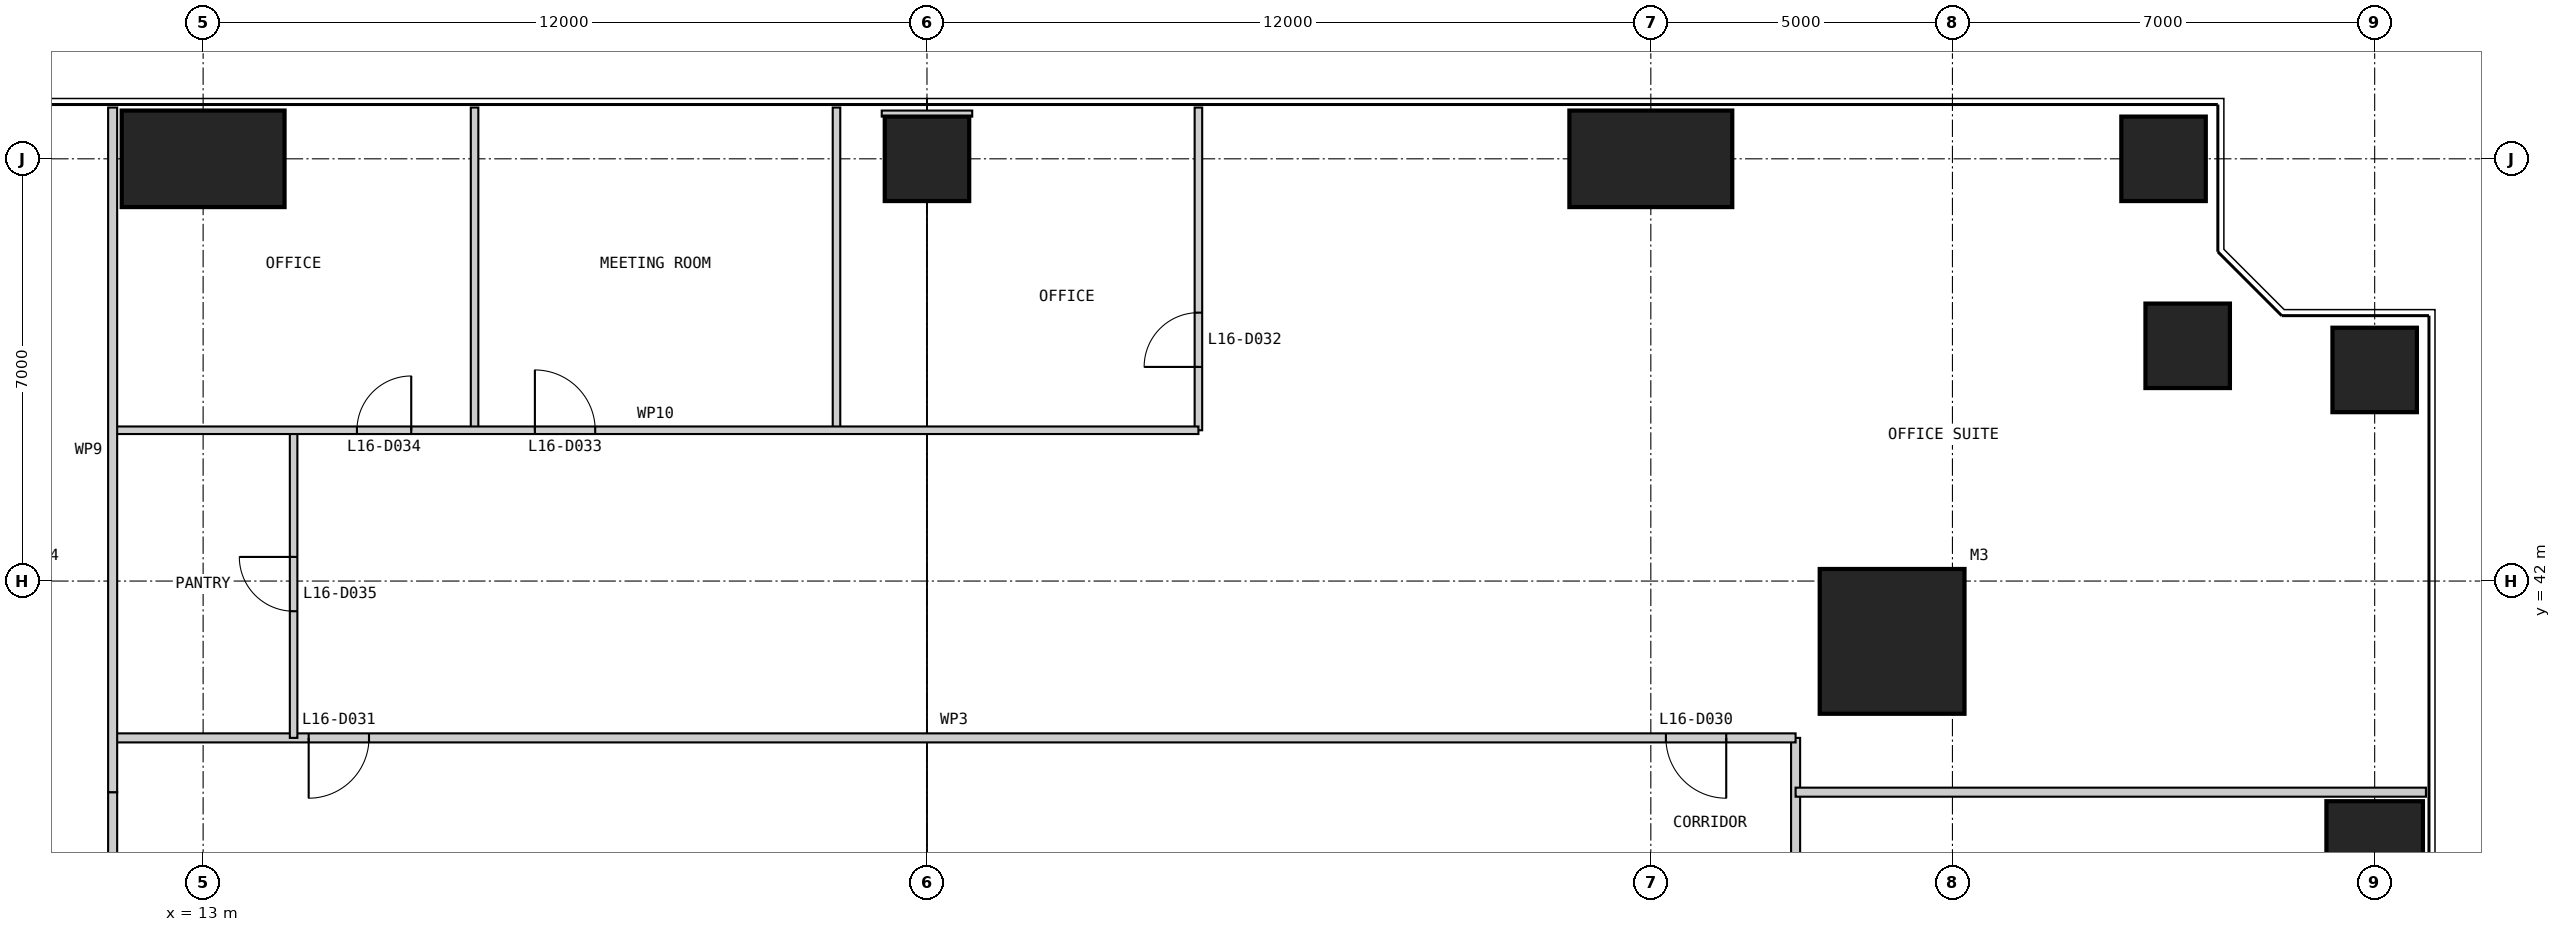
"""IFC4 building model, lengths in metres.
Left out: names, types, materials, properties, quantities, classifications, styles, units other than length and angle.
Written with IfcOpenShell. Run it as: python <this file> out.ifc"""

import sys

from ifc_helpers import new_model, si_unit, direction, frame, frame_2d, origin, origin_2d, place, context, subcontext, project, spatial, rectangle, extrude, element, fill, save


model = new_model("IFC4")
c1 = context("Model", 3, precision=1e-05, world=origin(), true_north=direction((0.0, 1.0)))
c2 = subcontext(c1, "Body", "Model", "MODEL_VIEW")
j1 = project(units=[si_unit("LENGTHUNIT", "METRE"), si_unit("PLANEANGLEUNIT", "RADIAN")], contexts=[c1])
p1 = place(None, origin())
s1 = spatial("IfcSite", under=j1, at=p1, CompositionType="ELEMENT")
p2 = place(p1, origin())
s2 = spatial("IfcBuilding", under=s1, at=p2, CompositionType="ELEMENT")
p3 = place(p2, frame((0.0, 0.0, 71.0)))
s3 = spatial("IfcBuildingStorey", under=s2, at=p3, CompositionType="ELEMENT", Elevation=71.0)
p4 = place(p3, frame((41.0, 41.0, 0.0), z_axis=(0.0, 0.0, 1.0), x_axis=(1.0, 0.0, 0.0)))
e1 = element("IfcColumn", 1, at=p4, inside=s3, PredefinedType="COLUMN", context=c2, shape_type="SweptSolid", body=[
    extrude(rectangle(XDim=2.4, YDim=2.4, at=origin_2d()), origin(), (0.0, 0.0, 1.0), 4.0),
])
p5 = place(p3, frame((49.0, 37.0, 0.0), z_axis=(0.0, 0.0, 1.0), x_axis=(1.0, 0.0, 0.0)))
e2 = element("IfcColumn", 2, at=p5, inside=s3, PredefinedType="COLUMN", context=c2, shape_type="SweptSolid", body=[
    extrude(rectangle(XDim=1.6, YDim=2.7, at=origin_2d()), origin(), (0.0, 0.0, 1.0), 4.0),
])
for number, where, z_axis, x_axis in (
    (3, (49.0, 45.5, 0.0), (0.0, 0.0, 1.0), (1.0, 0.0, 0.0)),
    (4, (45.9, 45.9, 0.0), (0.0, 0.0, 1.0), (1.0, 0.0, 0.0)),
    (5, (45.5, 49.0, 0.0), (0.0, 0.0, 1.0), (1.0, 0.0, 0.0)),
):
    element("IfcColumn", number, at=place(p3, frame(where, z_axis=z_axis, x_axis=x_axis)), inside=s3, PredefinedType="COLUMN", context=c2, shape_type="SweptSolid", body=[
        extrude(rectangle(XDim=1.4, YDim=1.4, at=origin_2d()), origin(), (0.0, 0.0, 1.0), 4.0),
    ])
p6 = place(p3, frame((37.0, 49.0, 0.0), z_axis=(0.0, 0.0, 1.0), x_axis=(1.0, 0.0, 0.0)))
e6 = element("IfcColumn", 6, at=p6, inside=s3, PredefinedType="COLUMN", context=c2, shape_type="SweptSolid", body=[
    extrude(rectangle(XDim=2.7, YDim=1.6, at=origin_2d()), origin(), (0.0, 0.0, 1.0), 4.0),
])
p7 = place(p3, frame((25.0, 49.0, 0.0), z_axis=(0.0, 0.0, 1.0), x_axis=(1.0, 0.0, 0.0)))
e7 = element("IfcColumn", 7, at=p7, inside=s3, PredefinedType="COLUMN", context=c2, shape_type="SweptSolid", body=[
    extrude(rectangle(XDim=1.4, YDim=1.4, at=origin_2d()), origin(), (0.0, 0.0, 1.0), 4.0),
])
p8 = place(p3, frame((13.0, 49.0, 0.0), z_axis=(0.0, 0.0, 1.0), x_axis=(1.0, 0.0, 0.0)))
e8 = element("IfcColumn", 8, at=p8, inside=s3, PredefinedType="COLUMN", context=c2, shape_type="SweptSolid", body=[
    extrude(rectangle(XDim=2.7, YDim=1.6, at=origin_2d()), origin(), (0.0, 0.0, 1.0), 4.0),
])
p9 = place(p3, frame((39.4, 11.5, 0.0), z_axis=(0.0, 0.0, 1.0), x_axis=(0.0, 1.0, 0.0)))
e9 = element("IfcWall", 9, at=p9, inside=s3, PredefinedType="PARTITIONING", context=c2, shape_type="SweptSolid", body=[
    extrude(rectangle(XDim=27.9, YDim=0.15, at=frame_2d((13.95, 0.0))), origin(), (0.0, 0.0, 1.0), 3.85),
])
p10 = place(p9, frame((2.5, 0.0, 0.0)))
e10 = element("IfcOpeningElement", 10, at=p10, cuts=e9, PredefinedType="OPENING", context=c2, shape_type="SweptSolid", body=[
    extrude(rectangle(XDim=1.0, YDim=2.2, at=frame_2d((0.5, 1.1))), frame((0.0, 0.085, 0.0), z_axis=(0.0, -1.0, 0.0), x_axis=(1.0, 0.0, 0.0)), (0.0, 0.0, 1.0), 0.17),
])
p11 = place(p9, frame((9.25, 0.0, 0.0)))
e11 = element("IfcOpeningElement", 11, at=p11, cuts=e9, PredefinedType="OPENING", context=c2, shape_type="SweptSolid", body=[
    extrude(rectangle(XDim=1.0, YDim=2.2, at=frame_2d((0.5, 1.1))), frame((0.0, 0.085, 0.0), z_axis=(0.0, -1.0, 0.0), x_axis=(1.0, 0.0, 0.0)), (0.0, 0.0, 1.0), 0.17),
])
p12 = place(p9, frame((16.75, 0.0, 0.0)))
e12 = element("IfcOpeningElement", 12, at=p12, cuts=e9, PredefinedType="OPENING", context=c2, shape_type="SweptSolid", body=[
    extrude(rectangle(XDim=1.0, YDim=2.2, at=frame_2d((0.5, 1.1))), frame((0.0, 0.085, 0.0), z_axis=(0.0, -1.0, 0.0), x_axis=(1.0, 0.0, 0.0)), (0.0, 0.0, 1.0), 0.17),
])
p13 = place(p9, frame((23.5, 0.0, 0.0)))
e13 = element("IfcOpeningElement", 13, at=p13, cuts=e9, PredefinedType="OPENING", context=c2, shape_type="SweptSolid", body=[
    extrude(rectangle(XDim=1.0, YDim=2.2, at=frame_2d((0.5, 1.1))), frame((0.0, 0.085, 0.0), z_axis=(0.0, -1.0, 0.0), x_axis=(1.0, 0.0, 0.0)), (0.0, 0.0, 1.0), 0.17),
])
p14 = place(p3, frame((39.4, 39.4, 0.0), z_axis=(0.0, 0.0, 1.0), x_axis=(-1.0, 0.0, 0.0)))
e14 = element("IfcWall", 14, at=p14, inside=s3, PredefinedType="PARTITIONING", context=c2, shape_type="SweptSolid", body=[
    extrude(rectangle(XDim=27.9, YDim=0.15, at=frame_2d((13.95, 0.0))), origin(), (0.0, 0.0, 1.0), 3.85),
])
p15 = place(p14, frame((1.15, 0.0, 0.0)))
e15 = element("IfcOpeningElement", 15, at=p15, cuts=e14, PredefinedType="OPENING", context=c2, shape_type="SweptSolid", body=[
    extrude(rectangle(XDim=1.0, YDim=2.2, at=frame_2d((0.5, 1.1))), frame((0.0, 0.085, 0.0), z_axis=(0.0, -1.0, 0.0), x_axis=(1.0, 0.0, 0.0)), (0.0, 0.0, 1.0), 0.17),
])
p16 = place(p14, frame((23.65, 0.0, 0.0)))
e16 = element("IfcOpeningElement", 16, at=p16, cuts=e14, PredefinedType="OPENING", context=c2, shape_type="SweptSolid", body=[
    extrude(rectangle(XDim=1.0, YDim=2.2, at=frame_2d((0.5, 1.1))), frame((0.0, 0.085, 0.0), z_axis=(0.0, -1.0, 0.0), x_axis=(1.0, 0.0, 0.0)), (0.0, 0.0, 1.0), 0.17),
])
p17 = place(p3, frame((49.85, 38.5, 0.0), z_axis=(0.0, 0.0, 1.0), x_axis=(-1.0, 0.0, 0.0)))
e17 = element("IfcWall", 17, at=p17, inside=s3, PredefinedType="PARTITIONING", context=c2, shape_type="SweptSolid", body=[
    extrude(rectangle(XDim=10.45, YDim=0.15, at=frame_2d((5.225, 0.0))), origin(), (0.0, 0.0, 1.0), 3.85),
])
p18 = place(p3, frame((29.5, 49.85, 0.0), z_axis=(0.0, 0.0, 1.0), x_axis=(0.0, -1.0, 0.0)))
e18 = element("IfcWall", 18, at=p18, inside=s3, PredefinedType="PARTITIONING", context=c2, shape_type="SweptSolid", body=[
    extrude(rectangle(XDim=5.35, YDim=0.125, at=frame_2d((2.675, 0.0))), origin(), (0.0, 0.0, 1.0), 3.85),
])
p19 = place(p18, frame((3.4, 0.0, 0.0)))
e19 = element("IfcOpeningElement", 19, at=p19, cuts=e18, PredefinedType="OPENING", context=c2, shape_type="SweptSolid", body=[
    extrude(rectangle(XDim=0.9, YDim=2.2, at=frame_2d((0.45, 1.1))), frame((0.0, 0.073, 0.0), z_axis=(0.0, -1.0, 0.0), x_axis=(1.0, 0.0, 0.0)), (0.0, 0.0, 1.0), 0.145),
])
for number, where, z_axis, x_axis in (
    (20, (23.5, 49.85, 0.0), (0.0, 0.0, 1.0), (0.0, -1.0, 0.0)),
    (21, (17.5, 49.85, 0.0), (0.0, 0.0, 1.0), (0.0, -1.0, 0.0)),
):
    element("IfcWall", number, at=place(p3, frame(where, z_axis=z_axis, x_axis=x_axis)), inside=s3, PredefinedType="PARTITIONING", context=c2, shape_type="SweptSolid", body=[
        extrude(rectangle(XDim=5.35, YDim=0.125, at=frame_2d((2.675, 0.0))), origin(), (0.0, 0.0, 1.0), 3.85),
    ])
p20 = place(p3, frame((14.5, 44.5, 0.0), z_axis=(0.0, 0.0, 1.0), x_axis=(0.0, -1.0, 0.0)))
e22 = element("IfcWall", 22, at=p20, inside=s3, PredefinedType="PARTITIONING", context=c2, shape_type="SweptSolid", body=[
    extrude(rectangle(XDim=5.1, YDim=0.125, at=frame_2d((2.55, 0.0))), origin(), (0.0, 0.0, 1.0), 3.85),
])
p21 = place(p20, frame((2.1, 0.0, 0.0)))
e23 = element("IfcOpeningElement", 23, at=p21, cuts=e22, PredefinedType="OPENING", context=c2, shape_type="SweptSolid", body=[
    extrude(rectangle(XDim=0.9, YDim=2.2, at=frame_2d((0.45, 1.1))), frame((0.0, 0.073, 0.0), z_axis=(0.0, -1.0, 0.0), x_axis=(1.0, 0.0, 0.0)), (0.0, 0.0, 1.0), 0.145),
])
p22 = place(p3, frame((29.5, 44.5, 0.0), z_axis=(0.0, 0.0, 1.0), x_axis=(-1.0, 0.0, 0.0)))
e24 = element("IfcWall", 24, at=p22, inside=s3, PredefinedType="PARTITIONING", context=c2, shape_type="SweptSolid", body=[
    extrude(rectangle(XDim=18.0, YDim=0.125, at=frame_2d((9.0, 0.0))), origin(), (0.0, 0.0, 1.0), 3.85),
])
p23 = place(p22, frame((10.0, 0.0, 0.0)))
e25 = element("IfcOpeningElement", 25, at=p23, cuts=e24, PredefinedType="OPENING", context=c2, shape_type="SweptSolid", body=[
    extrude(rectangle(XDim=1.0, YDim=2.2, at=frame_2d((0.5, 1.1))), frame((0.0, 0.073, 0.0), z_axis=(0.0, -1.0, 0.0), x_axis=(1.0, 0.0, 0.0)), (0.0, 0.0, 1.0), 0.145),
])
p24 = place(p22, frame((13.05, 0.0, 0.0)))
e26 = element("IfcOpeningElement", 26, at=p24, cuts=e24, PredefinedType="OPENING", context=c2, shape_type="SweptSolid", body=[
    extrude(rectangle(XDim=0.9, YDim=2.2, at=frame_2d((0.45, 1.1))), frame((0.0, 0.073, 0.0), z_axis=(0.0, -1.0, 0.0), x_axis=(1.0, 0.0, 0.0)), (0.0, 0.0, 1.0), 0.145),
])
p25 = place(p3, frame((11.5, 38.5, 0.0), z_axis=(0.0, 0.0, 1.0), x_axis=(0.0, -1.0, 0.0)))
e27 = element("IfcWall", 27, at=p25, inside=s3, PredefinedType="PARTITIONING", context=c2, shape_type="SweptSolid", body=[
    extrude(rectangle(XDim=27.0, YDim=0.15, at=frame_2d((13.5, 0.0))), origin(), (0.0, 0.0, 1.0), 3.85),
])
p26 = place(p25, frame((4.0, 0.0, 0.0)))
e28 = element("IfcOpeningElement", 28, at=p26, cuts=e27, PredefinedType="OPENING", context=c2, shape_type="SweptSolid", body=[
    extrude(rectangle(XDim=1.0, YDim=2.2, at=frame_2d((0.5, 1.1))), frame((0.0, 0.085, 0.0), z_axis=(0.0, -1.0, 0.0), x_axis=(1.0, 0.0, 0.0)), (0.0, 0.0, 1.0), 0.17),
])
p27 = place(p25, frame((10.0, 0.0, 0.0)))
e29 = element("IfcOpeningElement", 29, at=p27, cuts=e27, PredefinedType="OPENING", context=c2, shape_type="SweptSolid", body=[
    extrude(rectangle(XDim=1.0, YDim=2.2, at=frame_2d((0.5, 1.1))), frame((0.0, 0.085, 0.0), z_axis=(0.0, -1.0, 0.0), x_axis=(1.0, 0.0, 0.0)), (0.0, 0.0, 1.0), 0.17),
])
p28 = place(p25, frame((17.5, 0.0, 0.0)))
e30 = element("IfcOpeningElement", 30, at=p28, cuts=e27, PredefinedType="OPENING", context=c2, shape_type="SweptSolid", body=[
    extrude(rectangle(XDim=1.0, YDim=2.2, at=frame_2d((0.5, 1.1))), frame((0.0, 0.085, 0.0), z_axis=(0.0, -1.0, 0.0), x_axis=(1.0, 0.0, 0.0)), (0.0, 0.0, 1.0), 0.17),
])
p29 = place(p25, frame((23.5, 0.0, 0.0)))
e31 = element("IfcOpeningElement", 31, at=p29, cuts=e27, PredefinedType="OPENING", context=c2, shape_type="SweptSolid", body=[
    extrude(rectangle(XDim=1.0, YDim=2.2, at=frame_2d((0.5, 1.1))), frame((0.0, 0.085, 0.0), z_axis=(0.0, -1.0, 0.0), x_axis=(1.0, 0.0, 0.0)), (0.0, 0.0, 1.0), 0.17),
])
p30 = place(p3, frame((11.5, 49.85, 0.0), z_axis=(0.0, 0.0, 1.0), x_axis=(0.0, -1.0, 0.0)))
e32 = element("IfcWall", 32, at=p30, inside=s3, PredefinedType="PARTITIONING", context=c2, shape_type="SweptSolid", body=[
    extrude(rectangle(XDim=11.35, YDim=0.15, at=frame_2d((5.675, 0.0))), origin(), (0.0, 0.0, 1.0), 3.85),
])
p31 = place(p3, frame((25.0, 49.8, 0.0), z_axis=(0.0, 0.0, 1.0), x_axis=(0.0, -1.0, 0.0)))
e33 = element("IfcWall", 33, at=p31, inside=s3, PredefinedType="PARTITIONING", context=c2, shape_type="SweptSolid", body=[
    extrude(rectangle(XDim=0.1, YDim=1.5, at=frame_2d((0.05, 0.0))), origin(), (0.0, 0.0, 1.0), 3.85),
])
p32 = place(p15, origin())
e34 = element("IfcDoor", 34, at=p32, inside=s3, OperationType="SINGLE_SWING_LEFT", PredefinedType="DOOR", context=c2, shape_type="SweptSolid", body=[
    extrude(rectangle(XDim=1.0, YDim=2.2, at=frame_2d((0.5, 1.1))), frame((0.0, 0.025, 0.0), z_axis=(0.0, -1.0, 0.0), x_axis=(1.0, 0.0, 0.0)), (0.0, 0.0, 1.0), 0.05),
])
fill(e15, e34)
p33 = place(p16, origin())
e35 = element("IfcDoor", 35, at=p33, inside=s3, OperationType="SINGLE_SWING_RIGHT", PredefinedType="DOOR", context=c2, shape_type="SweptSolid", body=[
    extrude(rectangle(XDim=1.0, YDim=2.2, at=frame_2d((0.5, 1.1))), frame((0.0, 0.025, 0.0), z_axis=(0.0, -1.0, 0.0), x_axis=(1.0, 0.0, 0.0)), (0.0, 0.0, 1.0), 0.05),
])
fill(e16, e35)
p34 = place(p19, frame((0.9, 0.0, 0.0), z_axis=(0.0, 0.0, 1.0), x_axis=(-1.0, 0.0, 0.0)))
e36 = element("IfcDoor", 36, at=p34, inside=s3, OperationType="SINGLE_SWING_LEFT", PredefinedType="DOOR", context=c2, shape_type="SweptSolid", body=[
    extrude(rectangle(XDim=0.9, YDim=2.2, at=frame_2d((0.45, 1.1))), frame((0.0, 0.025, 0.0), z_axis=(0.0, -1.0, 0.0), x_axis=(1.0, 0.0, 0.0)), (0.0, 0.0, 1.0), 0.05),
])
fill(e19, e36)
p35 = place(p23, frame((1.0, 0.0, 0.0), z_axis=(0.0, 0.0, 1.0), x_axis=(-1.0, 0.0, 0.0)))
e37 = element("IfcDoor", 37, at=p35, inside=s3, OperationType="SINGLE_SWING_LEFT", PredefinedType="DOOR", context=c2, shape_type="SweptSolid", body=[
    extrude(rectangle(XDim=1.0, YDim=2.2, at=frame_2d((0.5, 1.1))), frame((0.0, 0.025, 0.0), z_axis=(0.0, -1.0, 0.0), x_axis=(1.0, 0.0, 0.0)), (0.0, 0.0, 1.0), 0.05),
])
fill(e25, e37)
p36 = place(p24, frame((0.9, 0.0, 0.0), z_axis=(0.0, 0.0, 1.0), x_axis=(-1.0, 0.0, 0.0)))
e38 = element("IfcDoor", 38, at=p36, inside=s3, OperationType="SINGLE_SWING_RIGHT", PredefinedType="DOOR", context=c2, shape_type="SweptSolid", body=[
    extrude(rectangle(XDim=0.9, YDim=2.2, at=frame_2d((0.45, 1.1))), frame((0.0, 0.025, 0.0), z_axis=(0.0, -1.0, 0.0), x_axis=(1.0, 0.0, 0.0)), (0.0, 0.0, 1.0), 0.05),
])
fill(e26, e38)
p37 = place(p21, frame((0.9, 0.0, 0.0), z_axis=(0.0, 0.0, 1.0), x_axis=(-1.0, 0.0, 0.0)))
e39 = element("IfcDoor", 39, at=p37, inside=s3, OperationType="SINGLE_SWING_RIGHT", PredefinedType="DOOR", context=c2, shape_type="SweptSolid", body=[
    extrude(rectangle(XDim=0.9, YDim=2.2, at=frame_2d((0.45, 1.1))), frame((0.0, 0.025, 0.0), z_axis=(0.0, -1.0, 0.0), x_axis=(1.0, 0.0, 0.0)), (0.0, 0.0, 1.0), 0.05),
])
fill(e23, e39)
save(model, sys.argv[1])
